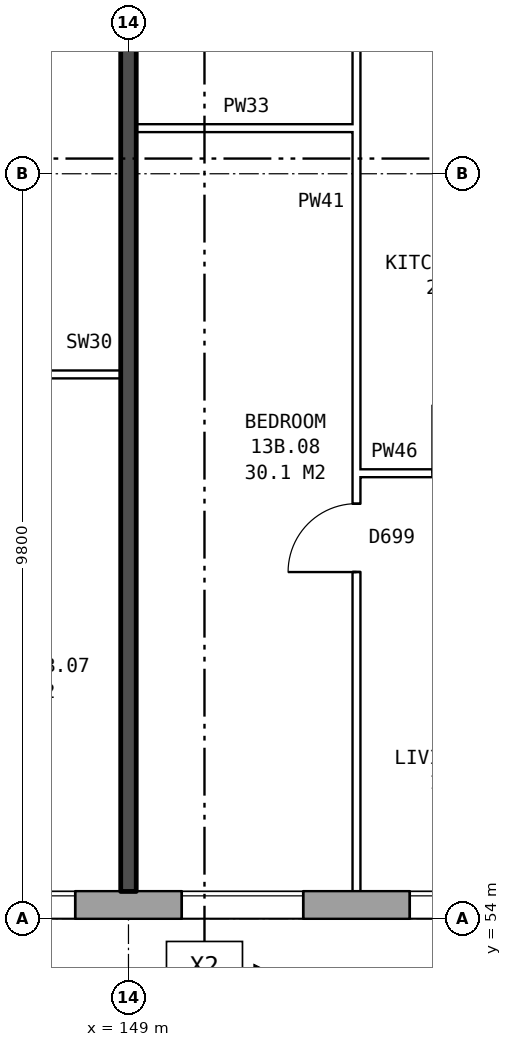
"""IFC4 building model, lengths in metres.
Left out: names, types, materials, properties, quantities, classifications, styles, units other than length and angle.
Written with IfcOpenShell. Run it as: python <this file> out.ifc"""

import sys

from ifc_helpers import new_model, si_unit, direction, frame, frame_2d, origin, place, context, subcontext, project, spatial, rectangle, extrude, element, fill, save


model = new_model("IFC4")
c1 = context("Model", 3, precision=1e-05, world=origin(), true_north=direction((0.0, 1.0)))
c2 = subcontext(c1, "Body", "Model", "MODEL_VIEW")
j1 = project(units=[si_unit("LENGTHUNIT", "METRE"), si_unit("PLANEANGLEUNIT", "RADIAN")], contexts=[c1])
p1 = place(None, origin())
s1 = spatial("IfcSite", under=j1, at=p1, CompositionType="ELEMENT")
p2 = place(p1, origin())
s2 = spatial("IfcBuilding", under=s1, at=p2, CompositionType="ELEMENT")
p3 = place(p2, frame((0.0, 0.0, 50.5)))
s3 = spatial("IfcBuildingStorey", under=s2, at=p3, CompositionType="ELEMENT", Elevation=50.5)
p4 = place(p3, frame((134.075, 54.18, 0.0), z_axis=(0.0, 0.0, 1.0), x_axis=(1.0, 0.0, 0.0)))
e1 = element("IfcWall", 1, at=p4, inside=s3, PredefinedType="STANDARD", context=c2, shape_type="SweptSolid", body=[
    extrude(rectangle(XDim=39.351, YDim=0.36, at=frame_2d((19.675, 0.0))), origin(), (0.0, 0.0, 1.0), 2.85),
])
p5 = place(p4, frame((0.625, 0.0, 0.8)))
e2 = element("IfcOpeningElement", 2, at=p5, cuts=e1, PredefinedType="OPENING", context=c2, shape_type="SweptSolid", body=[
    extrude(rectangle(XDim=1.6, YDim=1.8, at=frame_2d((0.8, 0.9))), frame((0.0, 0.19, 0.0), z_axis=(0.0, -1.0, 0.0), x_axis=(1.0, 0.0, 0.0)), (0.0, 0.0, 1.0), 0.38),
])
p6 = place(p4, frame((3.625, 0.0, 0.8)))
e3 = element("IfcOpeningElement", 3, at=p6, cuts=e1, PredefinedType="OPENING", context=c2, shape_type="SweptSolid", body=[
    extrude(rectangle(XDim=1.6, YDim=1.8, at=frame_2d((0.8, 0.9))), frame((0.0, 0.19, 0.0), z_axis=(0.0, -1.0, 0.0), x_axis=(1.0, 0.0, 0.0)), (0.0, 0.0, 1.0), 0.38),
])
p7 = place(p4, frame((5.525, 0.0, 1.4)))
e4 = element("IfcOpeningElement", 4, at=p7, cuts=e1, PredefinedType="OPENING", context=c2, shape_type="SweptSolid", body=[
    extrude(rectangle(XDim=0.6, YDim=1.2, at=frame_2d((0.3, 0.6))), frame((0.0, 0.19, 0.0), z_axis=(0.0, -1.0, 0.0), x_axis=(1.0, 0.0, 0.0)), (0.0, 0.0, 1.0), 0.38),
])
p8 = place(p4, frame((9.625, 0.0, 0.8)))
e5 = element("IfcOpeningElement", 5, at=p8, cuts=e1, PredefinedType="OPENING", context=c2, shape_type="SweptSolid", body=[
    extrude(rectangle(XDim=1.6, YDim=1.8, at=frame_2d((0.8, 0.9))), frame((0.0, 0.19, 0.0), z_axis=(0.0, -1.0, 0.0), x_axis=(1.0, 0.0, 0.0)), (0.0, 0.0, 1.0), 0.38),
])
p9 = place(p4, frame((12.625, 0.0, 0.8)))
e6 = element("IfcOpeningElement", 6, at=p9, cuts=e1, PredefinedType="OPENING", context=c2, shape_type="SweptSolid", body=[
    extrude(rectangle(XDim=1.6, YDim=1.8, at=frame_2d((0.8, 0.9))), frame((0.0, 0.19, 0.0), z_axis=(0.0, -1.0, 0.0), x_axis=(1.0, 0.0, 0.0)), (0.0, 0.0, 1.0), 0.38),
])
p10 = place(p4, frame((15.625, 0.0, 0.8)))
e7 = element("IfcOpeningElement", 7, at=p10, cuts=e1, PredefinedType="OPENING", context=c2, shape_type="SweptSolid", body=[
    extrude(rectangle(XDim=1.6, YDim=1.8, at=frame_2d((0.8, 0.9))), frame((0.0, 0.19, 0.0), z_axis=(0.0, -1.0, 0.0), x_axis=(1.0, 0.0, 0.0)), (0.0, 0.0, 1.0), 0.38),
])
p11 = place(p4, frame((18.625, 0.0, 0.8)))
e8 = element("IfcOpeningElement", 8, at=p11, cuts=e1, PredefinedType="OPENING", context=c2, shape_type="SweptSolid", body=[
    extrude(rectangle(XDim=1.6, YDim=1.8, at=frame_2d((0.8, 0.9))), frame((0.0, 0.19, 0.0), z_axis=(0.0, -1.0, 0.0), x_axis=(1.0, 0.0, 0.0)), (0.0, 0.0, 1.0), 0.38),
])
p12 = place(p4, frame((21.625, 0.0, 0.8)))
e9 = element("IfcOpeningElement", 9, at=p12, cuts=e1, PredefinedType="OPENING", context=c2, shape_type="SweptSolid", body=[
    extrude(rectangle(XDim=1.6, YDim=1.8, at=frame_2d((0.8, 0.9))), frame((0.0, 0.19, 0.0), z_axis=(0.0, -1.0, 0.0), x_axis=(1.0, 0.0, 0.0)), (0.0, 0.0, 1.0), 0.38),
])
p13 = place(p4, frame((24.625, 0.0, 0.8)))
e10 = element("IfcOpeningElement", 10, at=p13, cuts=e1, PredefinedType="OPENING", context=c2, shape_type="SweptSolid", body=[
    extrude(rectangle(XDim=1.6, YDim=1.8, at=frame_2d((0.8, 0.9))), frame((0.0, 0.19, 0.0), z_axis=(0.0, -1.0, 0.0), x_axis=(1.0, 0.0, 0.0)), (0.0, 0.0, 1.0), 0.38),
])
p14 = place(p4, frame((27.625, 0.0, 0.8)))
e11 = element("IfcOpeningElement", 11, at=p14, cuts=e1, PredefinedType="OPENING", context=c2, shape_type="SweptSolid", body=[
    extrude(rectangle(XDim=1.6, YDim=1.8, at=frame_2d((0.8, 0.9))), frame((0.0, 0.19, 0.0), z_axis=(0.0, -1.0, 0.0), x_axis=(1.0, 0.0, 0.0)), (0.0, 0.0, 1.0), 0.38),
])
p15 = place(p4, frame((30.125, 0.0, 0.8)))
e12 = element("IfcOpeningElement", 12, at=p15, cuts=e1, PredefinedType="OPENING", context=c2, shape_type="SweptSolid", body=[
    extrude(rectangle(XDim=0.6, YDim=1.5, at=frame_2d((0.3, 0.75))), frame((0.0, 0.19, 0.0), z_axis=(0.0, -1.0, 0.0), x_axis=(1.0, 0.0, 0.0)), (0.0, 0.0, 1.0), 0.38),
])
p16 = place(p4, frame((33.625, 0.0, 0.8)))
e13 = element("IfcOpeningElement", 13, at=p16, cuts=e1, PredefinedType="OPENING", context=c2, shape_type="SweptSolid", body=[
    extrude(rectangle(XDim=1.6, YDim=1.8, at=frame_2d((0.8, 0.9))), frame((0.0, 0.19, 0.0), z_axis=(0.0, -1.0, 0.0), x_axis=(1.0, 0.0, 0.0)), (0.0, 0.0, 1.0), 0.38),
])
p17 = place(p4, frame((36.625, 0.0, 0.8)))
e14 = element("IfcOpeningElement", 14, at=p17, cuts=e1, PredefinedType="OPENING", context=c2, shape_type="SweptSolid", body=[
    extrude(rectangle(XDim=1.6, YDim=1.8, at=frame_2d((0.8, 0.9))), frame((0.0, 0.19, 0.0), z_axis=(0.0, -1.0, 0.0), x_axis=(1.0, 0.0, 0.0)), (0.0, 0.0, 1.0), 0.38),
])
p18 = place(p4, frame((7.725, 0.0, 0.8)))
e15 = element("IfcOpeningElement", 15, at=p18, cuts=e1, PredefinedType="OPENING", context=c2, shape_type="SweptSolid", body=[
    extrude(rectangle(XDim=1.0, YDim=0.9, at=frame_2d((0.5, 0.45))), frame((0.0, 0.19, 0.0), z_axis=(0.0, -1.0, 0.0), x_axis=(1.0, 0.0, 0.0)), (0.0, 0.0, 1.0), 0.38),
])
p19 = place(p4, frame((31.025, 0.0, 0.8)))
e16 = element("IfcOpeningElement", 16, at=p19, cuts=e1, PredefinedType="OPENING", context=c2, shape_type="SweptSolid", body=[
    extrude(rectangle(XDim=0.6, YDim=0.9, at=frame_2d((0.3, 0.45))), frame((0.0, 0.19, 0.0), z_axis=(0.0, -1.0, 0.0), x_axis=(1.0, 0.0, 0.0)), (0.0, 0.0, 1.0), 0.38),
])
p20 = place(p3, frame((152.0, 59.86, 0.0), z_axis=(0.0, 0.0, 1.0), x_axis=(1.0, 0.0, 0.0)))
e17 = element("IfcWall", 17, at=p20, inside=s3, PredefinedType="PARTITIONING", context=c2, shape_type="SweptSolid", body=[
    extrude(rectangle(XDim=2.9, YDim=0.1, at=frame_2d((1.45, 0.0))), origin(), (0.0, 0.0, 1.0), 2.85),
])
p21 = place(p20, frame((1.0, 0.0, 0.0)))
e18 = element("IfcOpeningElement", 18, at=p21, cuts=e17, PredefinedType="OPENING", context=c2, shape_type="SweptSolid", body=[
    extrude(rectangle(XDim=0.9, YDim=2.1, at=frame_2d((0.45, 1.05))), frame((0.0, 0.06, 0.0), z_axis=(0.0, -1.0, 0.0), x_axis=(1.0, 0.0, 0.0)), (0.0, 0.0, 1.0), 0.12),
])
p22 = place(p3, frame((146.0, 61.16, 0.0), z_axis=(0.0, 0.0, 1.0), x_axis=(1.0, 0.0, 0.0)))
e19 = element("IfcWall", 19, at=p22, inside=s3, PredefinedType="PARTITIONING", context=c2, shape_type="SweptSolid", body=[
    extrude(rectangle(XDim=2.9, YDim=0.1, at=frame_2d((1.45, 0.0))), origin(), (0.0, 0.0, 1.0), 2.85),
])
p23 = place(p22, frame((1.0, 0.0, 0.0)))
e20 = element("IfcOpeningElement", 20, at=p23, cuts=e19, PredefinedType="OPENING", context=c2, shape_type="SweptSolid", body=[
    extrude(rectangle(XDim=0.9, YDim=2.1, at=frame_2d((0.45, 1.05))), frame((0.0, 0.06, 0.0), z_axis=(0.0, -1.0, 0.0), x_axis=(1.0, 0.0, 0.0)), (0.0, 0.0, 1.0), 0.12),
])
p24 = place(p3, frame((149.1, 64.4, 0.0), z_axis=(0.0, 0.0, 1.0), x_axis=(1.0, 0.0, 0.0)))
e21 = element("IfcWall", 21, at=p24, inside=s3, PredefinedType="PARTITIONING", context=c2, shape_type="SweptSolid", body=[
    extrude(rectangle(XDim=2.9, YDim=0.1, at=frame_2d((1.45, 0.0))), origin(), (0.0, 0.0, 1.0), 2.85),
])
p25 = place(p3, frame((149.0, 54.36, 0.0), z_axis=(0.0, 0.0, 1.0), x_axis=(0.0, 1.0, 0.0)))
e22 = element("IfcWall", 22, at=p25, inside=s3, PredefinedType="SOLIDWALL", context=c2, shape_type="SweptSolid", body=[
    extrude(rectangle(XDim=14.44, YDim=0.2, at=frame_2d((7.22, 0.0))), origin(), (0.0, 0.0, 1.0), 2.85),
])
p26 = place(p3, frame((152.0, 54.36, 0.0), z_axis=(0.0, 0.0, 1.0), x_axis=(0.0, 1.0, 0.0)))
e23 = element("IfcWall", 23, at=p26, inside=s3, PredefinedType="PARTITIONING", context=c2, shape_type="SweptSolid", body=[
    extrude(rectangle(XDim=14.34, YDim=0.1, at=frame_2d((7.17, 0.0))), origin(), (0.0, 0.0, 1.0), 2.85),
])
p27 = place(p26, frame((4.2, 0.0, 0.0)))
e24 = element("IfcOpeningElement", 24, at=p27, cuts=e23, PredefinedType="OPENING", context=c2, shape_type="SweptSolid", body=[
    extrude(rectangle(XDim=0.9, YDim=2.1, at=frame_2d((0.45, 1.05))), frame((0.0, 0.06, 0.0), z_axis=(0.0, -1.0, 0.0), x_axis=(1.0, 0.0, 0.0)), (0.0, 0.0, 1.0), 0.12),
])
p28 = place(p26, frame((13.04, 0.0, 0.0)))
e25 = element("IfcOpeningElement", 25, at=p28, cuts=e23, PredefinedType="OPENING", context=c2, shape_type="SweptSolid", body=[
    extrude(rectangle(XDim=0.9, YDim=2.1, at=frame_2d((0.45, 1.05))), frame((0.0, 0.06, 0.0), z_axis=(0.0, -1.0, 0.0), x_axis=(1.0, 0.0, 0.0)), (0.0, 0.0, 1.0), 0.12),
])
p29 = place(p9, origin())
e26 = element("IfcWindow", 26, at=p29, inside=s3, PartitioningType="SINGLE_PANEL", PredefinedType="WINDOW", context=c2, shape_type="SweptSolid", body=[
    extrude(rectangle(XDim=1.6, YDim=1.8, at=frame_2d((0.8, 0.9))), frame((0.0, 0.15, 0.0), z_axis=(0.0, -1.0, 0.0), x_axis=(1.0, 0.0, 0.0)), (0.0, 0.0, 1.0), 0.06),
])
fill(e6, e26)
p30 = place(p10, origin())
e27 = element("IfcWindow", 27, at=p30, inside=s3, PartitioningType="SINGLE_PANEL", PredefinedType="WINDOW", context=c2, shape_type="SweptSolid", body=[
    extrude(rectangle(XDim=1.6, YDim=1.8, at=frame_2d((0.8, 0.9))), frame((0.0, 0.15, 0.0), z_axis=(0.0, -1.0, 0.0), x_axis=(1.0, 0.0, 0.0)), (0.0, 0.0, 1.0), 0.06),
])
fill(e7, e27)
p31 = place(p11, origin())
e28 = element("IfcWindow", 28, at=p31, inside=s3, PartitioningType="SINGLE_PANEL", PredefinedType="WINDOW", context=c2, shape_type="SweptSolid", body=[
    extrude(rectangle(XDim=1.6, YDim=1.8, at=frame_2d((0.8, 0.9))), frame((0.0, 0.15, 0.0), z_axis=(0.0, -1.0, 0.0), x_axis=(1.0, 0.0, 0.0)), (0.0, 0.0, 1.0), 0.06),
])
fill(e8, e28)
p32 = place(p27, origin())
e29 = element("IfcDoor", 29, at=p32, inside=s3, OperationType="SINGLE_SWING_LEFT", PredefinedType="DOOR", context=c2, shape_type="SweptSolid", body=[
    extrude(rectangle(XDim=0.9, YDim=2.1, at=frame_2d((0.45, 1.05))), frame((0.0, 0.025, 0.0), z_axis=(0.0, -1.0, 0.0), x_axis=(1.0, 0.0, 0.0)), (0.0, 0.0, 1.0), 0.05),
])
fill(e24, e29)
save(model, sys.argv[1])
